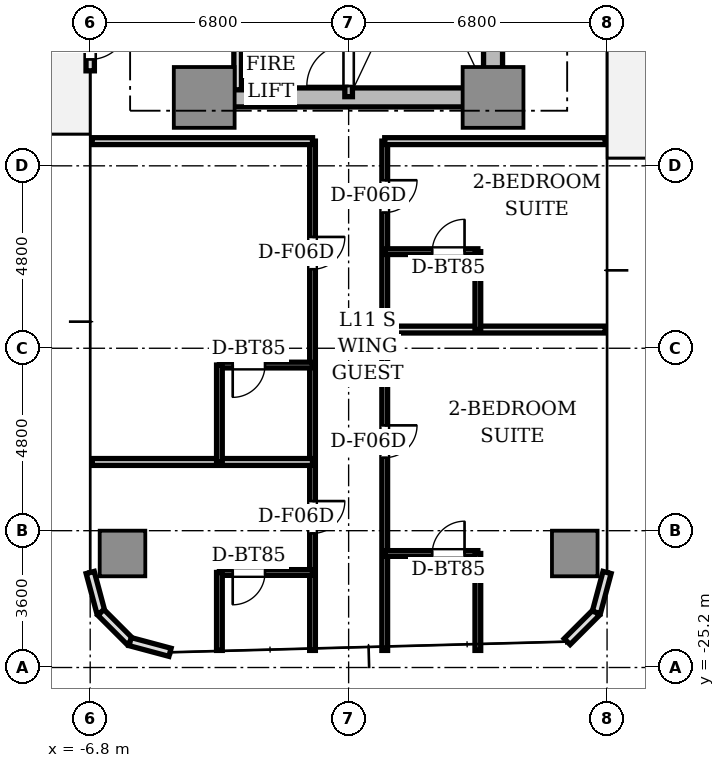
"""IFC4 building model, lengths in metres.
Left out: names, types, materials, properties, quantities, classifications, styles, units other than length and angle.
Written with IfcOpenShell. Run it as: python <this file> out.ifc"""

import sys

from ifc_helpers import new_model, si_unit, direction, frame, frame_2d, origin, origin_2d, place, context, subcontext, project, spatial, rectangle, extrude, source, transform, mapped, element, fill, save


model = new_model("IFC4")
c1 = context("Model", 3, precision=1e-05, world=origin(), true_north=direction((0.0, 1.0)))
c2 = subcontext(c1, "Body", "Model", "MODEL_VIEW")
j1 = project(units=[si_unit("LENGTHUNIT", "METRE"), si_unit("PLANEANGLEUNIT", "RADIAN")], contexts=[c1])
p1 = place(None, origin())
s1 = spatial("IfcSite", under=j1, at=p1, CompositionType="ELEMENT")
p2 = place(p1, origin())
s2 = spatial("IfcBuilding", under=s1, at=p2, CompositionType="ELEMENT")
p3 = place(p2, frame((0.0, 0.0, 43.2)))
s3 = spatial("IfcBuildingStorey", under=s2, at=p3, CompositionType="ELEMENT", Elevation=43.2)
p4 = place(p3, frame((-3.55, -10.2, 0.0), z_axis=(0.0, 0.0, 1.0), x_axis=(1.0, 0.0, 0.0)))
e1 = element("IfcWall", 1, at=p4, inside=s3, PredefinedType="SHEAR", context=c2, shape_type="SweptSolid", body=[
    extrude(rectangle(XDim=7.1, YDim=0.5, at=frame_2d((3.55, 0.0))), origin(), (0.0, 0.0, 1.0), 3.05),
])
p5 = place(p3, frame((3.8, -9.75, 0.0), z_axis=(0.0, 0.0, 1.0), x_axis=(0.0, 1.0, 0.0)))
e2 = element("IfcWall", 2, at=p5, inside=s3, PredefinedType="SHEAR", context=c2, shape_type="SweptSolid", body=[
    extrude(rectangle(XDim=6.9, YDim=0.5, at=frame_2d((3.45, 0.0))), origin(), (0.0, 0.0, 1.0), 3.05),
])
m1 = source(origin(), c2, "Body", "SweptSolid", [
    extrude(rectangle(XDim=1.6, YDim=1.6, at=origin_2d()), origin(), (0.0, 0.0, 1.0), 3.05),
])
for number, where, z_axis, x_axis in (
    (3, (-3.8, -10.2, 0.0), (0.0, 0.0, 1.0), (1.0, 0.0, 0.0)),
    (4, (3.8, -10.2, 0.0), (0.0, 0.0, 1.0), (1.0, 0.0, 0.0)),
):
    element("IfcColumn", number, at=place(p3, frame(where, z_axis=z_axis, x_axis=x_axis)), inside=s3, PredefinedType="COLUMN", context=c2, shape_type="MappedRepresentation", body=[
        mapped(m1, transform((0.0, 0.0, 0.0), scale=1.0)),
    ])
m2 = source(origin(), c2, "Body", "SweptSolid", [
    extrude(rectangle(XDim=1.2, YDim=1.2, at=origin_2d()), origin(), (0.0, 0.0, 1.0), 3.05),
])
for number, where, z_axis, x_axis in (
    (5, (-5.95, -22.2, 0.0), (0.0, 0.0, 1.0), (1.0, 0.0, 0.0)),
    (6, (5.95, -22.2, 0.0), (0.0, 0.0, 1.0), (1.0, 0.0, 0.0)),
):
    element("IfcColumn", number, at=place(p3, frame(where, z_axis=z_axis, x_axis=x_axis)), inside=s3, PredefinedType="COLUMN", context=c2, shape_type="MappedRepresentation", body=[
        mapped(m2, transform((0.0, 0.0, 0.0), scale=1.0)),
    ])
p6 = place(p3, frame((-6.8, -6.8, 0.0), z_axis=(0.0, 0.0, 1.0), x_axis=(0.0, -1.0, 0.0)))
e7 = element("IfcWall", 7, at=p6, inside=s3, PredefinedType="STANDARD", context=c2, shape_type="SweptSolid", body=[
    extrude(rectangle(XDim=2.7, YDim=0.22, at=frame_2d((1.35, 0.0))), origin(), (0.0, 0.0, 1.0), 3.05),
])
p7 = place(p6, frame((1.4, 0.0, 0.0)))
e8 = element("IfcOpeningElement", 8, at=p7, cuts=e7, PredefinedType="OPENING", context=c2, shape_type="SweptSolid", body=[
    extrude(rectangle(XDim=1.0, YDim=2.2, at=frame_2d((0.5, 1.1))), frame((0.0, 0.12, 0.0), z_axis=(0.0, -1.0, 0.0), x_axis=(1.0, 0.0, 0.0)), (0.0, 0.0, 1.0), 0.24),
])
for number, where, z_axis, x_axis in (
    (9, (-6.8, -22.7, 0.0), (0.0, 0.0, 1.0), (0.259, -0.966, 0.0)),
    (10, (-6.519, -23.75, 0.0), (0.0, 0.0, 1.0), (0.707, -0.707, 0.0)),
    (11, (-5.75, -24.519, 0.0), (0.0, 0.0, 1.0), (0.966, -0.259, 0.0)),
    (12, (5.75, -24.519, 0.0), (0.0, 0.0, 1.0), (0.707, 0.707, 0.0)),
    (13, (6.519, -23.75, 0.0), (0.0, 0.0, 1.0), (0.259, 0.966, 0.0)),
):
    element("IfcWall", number, at=place(p3, frame(where, z_axis=z_axis, x_axis=x_axis)), inside=s3, PredefinedType="STANDARD", context=c2, shape_type="SweptSolid", body=[
        extrude(rectangle(XDim=1.087, YDim=0.22, at=frame_2d((0.543, 0.0))), origin(), (0.0, 0.0, 1.0), 3.05),
    ])
p8 = place(p3, frame((0.0, -10.18, 0.0), z_axis=(0.0, 0.0, 1.0), x_axis=(0.0, 1.0, 0.0)))
e14 = element("IfcWall", 14, at=p8, inside=s3, PredefinedType="SOLIDWALL", context=c2, shape_type="SweptSolid", body=[
    extrude(rectangle(XDim=7.68, YDim=0.2, at=frame_2d((3.84, 0.0))), origin(), (0.0, 0.0, 1.0), 3.05),
])
p9 = place(p8, frame((0.28, 0.0, 0.0)))
e15 = element("IfcOpeningElement", 15, at=p9, cuts=e14, PredefinedType="OPENING", context=c2, shape_type="SweptSolid", body=[
    extrude(rectangle(XDim=1.1, YDim=2.15, at=frame_2d((0.55, 1.075))), frame((0.0, 0.11, 0.0), z_axis=(0.0, -1.0, 0.0), x_axis=(1.0, 0.0, 0.0)), (0.0, 0.0, 1.0), 0.22),
])
p10 = place(p3, frame((-2.92, -10.0, 0.0), z_axis=(0.0, 0.0, 1.0), x_axis=(0.0, 1.0, 0.0)))
e16 = element("IfcWall", 16, at=p10, inside=s3, PredefinedType="SOLIDWALL", context=c2, shape_type="SweptSolid", body=[
    extrude(rectangle(XDim=1.44, YDim=0.2, at=frame_2d((0.72, 0.0))), origin(), (0.0, 0.0, 1.0), 2.6),
])
p11 = place(p3, frame((0.95, -11.35, 0.0), z_axis=(0.0, 0.0, 1.0), x_axis=(0.0, -1.0, 0.0)))
e17 = element("IfcWall", 17, at=p11, inside=s3, PredefinedType="PARTITIONING", context=c2, shape_type="SweptSolid", body=[
    extrude(rectangle(XDim=13.4, YDim=0.15, at=frame_2d((6.7, 0.0))), origin(), (0.0, 0.0, 1.0), 2.6),
])
p12 = place(p11, frame((1.029, 0.0, 0.0)))
e18 = element("IfcOpeningElement", 18, at=p12, cuts=e17, PredefinedType="OPENING", context=c2, shape_type="SweptSolid", body=[
    extrude(rectangle(XDim=0.85, YDim=2.1, at=frame_2d((0.425, 1.05))), frame((0.0, 0.085, 0.0), z_axis=(0.0, -1.0, 0.0), x_axis=(1.0, 0.0, 0.0)), (0.0, 0.0, 1.0), 0.17),
])
p13 = place(p11, frame((7.479, 0.0, 0.0)))
e19 = element("IfcOpeningElement", 19, at=p13, cuts=e17, PredefinedType="OPENING", context=c2, shape_type="SweptSolid", body=[
    extrude(rectangle(XDim=0.85, YDim=2.1, at=frame_2d((0.425, 1.05))), frame((0.0, 0.085, 0.0), z_axis=(0.0, -1.0, 0.0), x_axis=(1.0, 0.0, 0.0)), (0.0, 0.0, 1.0), 0.17),
])
p14 = place(p3, frame((-0.95, -11.35, 0.0), z_axis=(0.0, 0.0, 1.0), x_axis=(0.0, -1.0, 0.0)))
e20 = element("IfcWall", 20, at=p14, inside=s3, PredefinedType="PARTITIONING", context=c2, shape_type="SweptSolid", body=[
    extrude(rectangle(XDim=13.4, YDim=0.15, at=frame_2d((6.7, 0.0))), origin(), (0.0, 0.0, 1.0), 2.6),
])
p15 = place(p14, frame((2.521, 0.0, 0.0)))
e21 = element("IfcOpeningElement", 21, at=p15, cuts=e20, PredefinedType="OPENING", context=c2, shape_type="SweptSolid", body=[
    extrude(rectangle(XDim=0.85, YDim=2.1, at=frame_2d((0.425, 1.05))), frame((0.0, 0.085, 0.0), z_axis=(0.0, -1.0, 0.0), x_axis=(1.0, 0.0, 0.0)), (0.0, 0.0, 1.0), 0.17),
])
p16 = place(p14, frame((9.471, 0.0, 0.0)))
e22 = element("IfcOpeningElement", 22, at=p16, cuts=e20, PredefinedType="OPENING", context=c2, shape_type="SweptSolid", body=[
    extrude(rectangle(XDim=0.85, YDim=2.1, at=frame_2d((0.425, 1.05))), frame((0.0, 0.085, 0.0), z_axis=(0.0, -1.0, 0.0), x_axis=(1.0, 0.0, 0.0)), (0.0, 0.0, 1.0), 0.17),
])
for number, where, z_axis, x_axis in (
    (23, (0.95, -11.35, 0.0), (0.0, 0.0, 1.0), (1.0, 0.0, 0.0)),
    (24, (-6.75, -11.35, 0.0), (0.0, 0.0, 1.0), (1.0, 0.0, 0.0)),
    (25, (0.95, -16.308, 0.0), (0.0, 0.0, 1.0), (1.0, 0.0, 0.0)),
):
    element("IfcWall", number, at=place(p3, frame(where, z_axis=z_axis, x_axis=x_axis)), inside=s3, PredefinedType="PARTITIONING", context=c2, shape_type="SweptSolid", body=[
        extrude(rectangle(XDim=5.8, YDim=0.18, at=frame_2d((2.9, 0.0))), origin(), (0.0, 0.0, 1.0), 2.6),
    ])
p17 = place(p3, frame((0.95, -14.258, 0.0), z_axis=(0.0, 0.0, 1.0), x_axis=(1.0, 0.0, 0.0)))
e26 = element("IfcWall", 26, at=p17, inside=s3, PredefinedType="PARTITIONING", context=c2, shape_type="SweptSolid", body=[
    extrude(rectangle(XDim=2.45, YDim=0.15, at=frame_2d((1.225, 0.0))), origin(), (0.0, 0.0, 1.0), 2.6),
])
p18 = place(p17, frame((1.25, 0.0, 0.0)))
e27 = element("IfcOpeningElement", 27, at=p18, cuts=e26, PredefinedType="OPENING", context=c2, shape_type="SweptSolid", body=[
    extrude(rectangle(XDim=0.85, YDim=2.1, at=frame_2d((0.425, 1.05))), frame((0.0, 0.085, 0.0), z_axis=(0.0, -1.0, 0.0), x_axis=(1.0, 0.0, 0.0)), (0.0, 0.0, 1.0), 0.17),
])
p19 = place(p3, frame((3.4, -14.258, 0.0), z_axis=(0.0, 0.0, 1.0), x_axis=(0.0, -1.0, 0.0)))
e28 = element("IfcWall", 28, at=p19, inside=s3, PredefinedType="PARTITIONING", context=c2, shape_type="SweptSolid", body=[
    extrude(rectangle(XDim=2.05, YDim=0.15, at=frame_2d((1.025, 0.0))), origin(), (0.0, 0.0, 1.0), 2.6),
])
p20 = place(p3, frame((0.95, -22.2, 0.0), z_axis=(0.0, 0.0, 1.0), x_axis=(1.0, 0.0, 0.0)))
e29 = element("IfcWall", 29, at=p20, inside=s3, PredefinedType="PARTITIONING", context=c2, shape_type="SweptSolid", body=[
    extrude(rectangle(XDim=2.45, YDim=0.15, at=frame_2d((1.225, 0.0))), origin(), (0.0, 0.0, 1.0), 2.52),
])
p21 = place(p20, frame((1.25, 0.0, 0.0)))
e30 = element("IfcOpeningElement", 30, at=p21, cuts=e29, PredefinedType="OPENING", context=c2, shape_type="SweptSolid", body=[
    extrude(rectangle(XDim=0.85, YDim=2.1, at=frame_2d((0.425, 1.05))), frame((0.0, 0.085, 0.0), z_axis=(0.0, -1.0, 0.0), x_axis=(1.0, 0.0, 0.0)), (0.0, 0.0, 1.0), 0.17),
])
p22 = place(p3, frame((3.4, -22.2, 0.0), z_axis=(0.0, 0.0, 1.0), x_axis=(0.0, -1.0, 0.0)))
e31 = element("IfcWall", 31, at=p22, inside=s3, PredefinedType="PARTITIONING", context=c2, shape_type="SweptSolid", body=[
    extrude(rectangle(XDim=2.55, YDim=0.15, at=frame_2d((1.275, 0.0))), origin(), (0.0, 0.0, 1.0), 2.6),
])
p23 = place(p3, frame((-0.95, -19.792, 0.0), z_axis=(0.0, 0.0, 1.0), x_axis=(-1.0, 0.0, 0.0)))
e32 = element("IfcWall", 32, at=p23, inside=s3, PredefinedType="PARTITIONING", context=c2, shape_type="SweptSolid", body=[
    extrude(rectangle(XDim=5.8, YDim=0.18, at=frame_2d((2.9, 0.0))), origin(), (0.0, 0.0, 1.0), 2.6),
])
p24 = place(p3, frame((-0.95, -17.242, 0.0), z_axis=(0.0, 0.0, 1.0), x_axis=(-1.0, 0.0, 0.0)))
e33 = element("IfcWall", 33, at=p24, inside=s3, PredefinedType="PARTITIONING", context=c2, shape_type="SweptSolid", body=[
    extrude(rectangle(XDim=2.45, YDim=0.15, at=frame_2d((1.225, 0.0))), origin(), (0.0, 0.0, 1.0), 2.6),
])
p25 = place(p24, frame((1.25, 0.0, 0.0)))
e34 = element("IfcOpeningElement", 34, at=p25, cuts=e33, PredefinedType="OPENING", context=c2, shape_type="SweptSolid", body=[
    extrude(rectangle(XDim=0.85, YDim=2.1, at=frame_2d((0.425, 1.05))), frame((0.0, 0.085, 0.0), z_axis=(0.0, -1.0, 0.0), x_axis=(1.0, 0.0, 0.0)), (0.0, 0.0, 1.0), 0.17),
])
p26 = place(p3, frame((-3.4, -17.242, 0.0), z_axis=(0.0, 0.0, 1.0), x_axis=(0.0, -1.0, 0.0)))
e35 = element("IfcWall", 35, at=p26, inside=s3, PredefinedType="PARTITIONING", context=c2, shape_type="SweptSolid", body=[
    extrude(rectangle(XDim=2.55, YDim=0.15, at=frame_2d((1.275, 0.0))), origin(), (0.0, 0.0, 1.0), 2.6),
])
p27 = place(p3, frame((-0.95, -22.7, 0.0), z_axis=(0.0, 0.0, 1.0), x_axis=(-1.0, 0.0, 0.0)))
e36 = element("IfcWall", 36, at=p27, inside=s3, PredefinedType="PARTITIONING", context=c2, shape_type="SweptSolid", body=[
    extrude(rectangle(XDim=2.45, YDim=0.15, at=frame_2d((1.225, 0.0))), origin(), (0.0, 0.0, 1.0), 2.6),
])
p28 = place(p27, frame((1.25, 0.0, 0.0)))
e37 = element("IfcOpeningElement", 37, at=p28, cuts=e36, PredefinedType="OPENING", context=c2, shape_type="SweptSolid", body=[
    extrude(rectangle(XDim=0.85, YDim=2.1, at=frame_2d((0.425, 1.05))), frame((0.0, 0.085, 0.0), z_axis=(0.0, -1.0, 0.0), x_axis=(1.0, 0.0, 0.0)), (0.0, 0.0, 1.0), 0.17),
])
p29 = place(p3, frame((-3.4, -22.7, 0.0), z_axis=(0.0, 0.0, 1.0), x_axis=(0.0, -1.0, 0.0)))
e38 = element("IfcWall", 38, at=p29, inside=s3, PredefinedType="PARTITIONING", context=c2, shape_type="SweptSolid", body=[
    extrude(rectangle(XDim=2.05, YDim=0.15, at=frame_2d((1.025, 0.0))), origin(), (0.0, 0.0, 1.0), 2.6),
])
m3 = source(origin(), c2, "Body", "SweptSolid", [
    extrude(rectangle(XDim=1.0, YDim=0.05, at=origin_2d()), origin(), (0.0, 0.0, 1.0), 2.2),
])
p30 = place(p7, frame((0.5, 0.0, 0.0)))
e39 = element("IfcDoor", 39, at=p30, inside=s3, OperationType="SINGLE_SWING_LEFT", PredefinedType="DOOR", context=c2, shape_type="MappedRepresentation", body=[
    mapped(m3, transform((0.0, 0.0, 0.0), scale=1.0)),
])
fill(e8, e39)
m4 = source(origin(), c2, "Body", "SweptSolid", [
    extrude(rectangle(XDim=1.1, YDim=0.05, at=origin_2d()), origin(), (0.0, 0.0, 1.0), 2.15),
])
p31 = place(p9, frame((0.55, 0.0, 0.0)))
e40 = element("IfcDoor", 40, at=p31, inside=s3, OperationType="SINGLE_SWING_LEFT", PredefinedType="DOOR", context=c2, shape_type="MappedRepresentation", body=[
    mapped(m4, transform((0.0, 0.0, 0.0), scale=1.0)),
])
fill(e15, e40)
m5 = source(origin(), c2, "Body", "SweptSolid", [
    extrude(rectangle(XDim=0.85, YDim=0.05, at=origin_2d()), origin(), (0.0, 0.0, 1.0), 2.1),
])
p32 = place(p18, frame((0.425, 0.0, 0.0)))
e41 = element("IfcDoor", 41, at=p32, inside=s3, OperationType="SINGLE_SWING_RIGHT", PredefinedType="DOOR", context=c2, shape_type="MappedRepresentation", body=[
    mapped(m5, transform((0.0, 0.0, 0.0), scale=1.0)),
])
fill(e27, e41)
p33 = place(p12, frame((0.425, 0.0, 0.0)))
e42 = element("IfcDoor", 42, at=p33, inside=s3, OperationType="SINGLE_SWING_LEFT", PredefinedType="DOOR", context=c2, shape_type="MappedRepresentation", body=[
    mapped(m5, transform((0.0, 0.0, 0.0), scale=1.0)),
])
fill(e18, e42)
p34 = place(p21, frame((0.425, 0.0, 0.0)))
e43 = element("IfcDoor", 43, at=p34, inside=s3, OperationType="SINGLE_SWING_RIGHT", PredefinedType="DOOR", context=c2, shape_type="MappedRepresentation", body=[
    mapped(m5, transform((0.0, 0.0, 0.0), scale=1.0)),
])
fill(e30, e43)
p35 = place(p13, frame((0.425, 0.0, 0.0)))
e44 = element("IfcDoor", 44, at=p35, inside=s3, OperationType="SINGLE_SWING_LEFT", PredefinedType="DOOR", context=c2, shape_type="MappedRepresentation", body=[
    mapped(m5, transform((0.0, 0.0, 0.0), scale=1.0)),
])
fill(e19, e44)
p36 = place(p25, frame((0.425, 0.0, 0.0)))
e45 = element("IfcDoor", 45, at=p36, inside=s3, OperationType="SINGLE_SWING_RIGHT", PredefinedType="DOOR", context=c2, shape_type="MappedRepresentation", body=[
    mapped(m5, transform((0.0, 0.0, 0.0), scale=1.0)),
])
fill(e34, e45)
p37 = place(p15, frame((0.425, 0.0, 0.0)))
e46 = element("IfcDoor", 46, at=p37, inside=s3, OperationType="SINGLE_SWING_LEFT", PredefinedType="DOOR", context=c2, shape_type="MappedRepresentation", body=[
    mapped(m5, transform((0.0, 0.0, 0.0), scale=1.0)),
])
fill(e21, e46)
p38 = place(p28, frame((0.425, 0.0, 0.0)))
e47 = element("IfcDoor", 47, at=p38, inside=s3, OperationType="SINGLE_SWING_RIGHT", PredefinedType="DOOR", context=c2, shape_type="MappedRepresentation", body=[
    mapped(m5, transform((0.0, 0.0, 0.0), scale=1.0)),
])
fill(e37, e47)
p39 = place(p16, frame((0.425, 0.0, 0.0)))
e48 = element("IfcDoor", 48, at=p39, inside=s3, OperationType="SINGLE_SWING_LEFT", PredefinedType="DOOR", context=c2, shape_type="MappedRepresentation", body=[
    mapped(m5, transform((0.0, 0.0, 0.0), scale=1.0)),
])
fill(e22, e48)
save(model, sys.argv[1])
